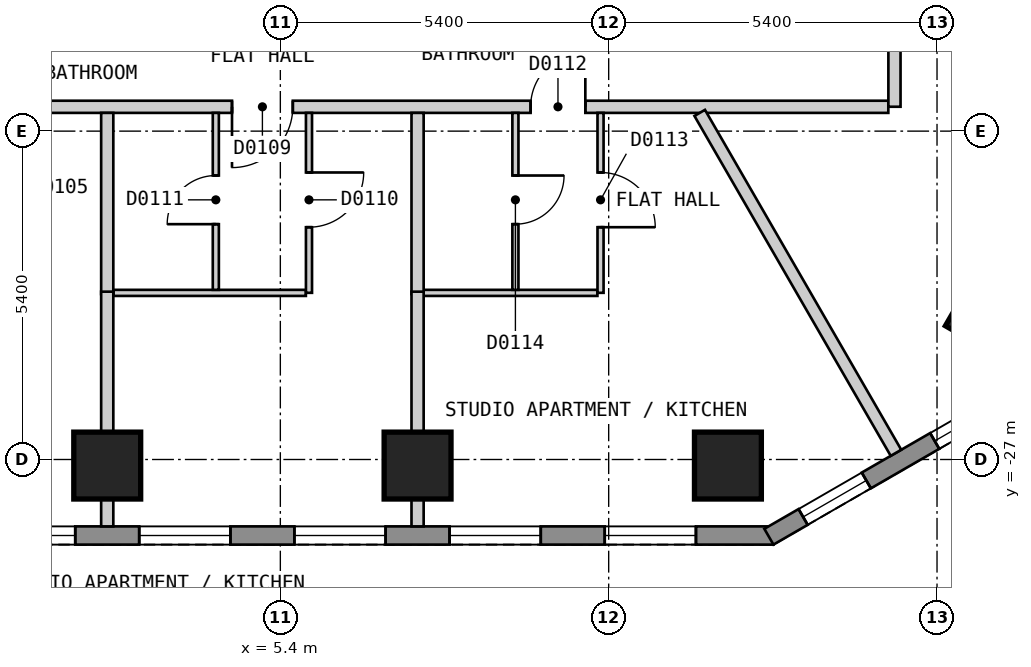
"""IFC4 building model, lengths in metres.
Left out: names, types, materials, properties, quantities, classifications, styles, units other than length and angle.
Written with IfcOpenShell. Run it as: python <this file> out.ifc"""

import sys

from ifc_helpers import new_model, si_unit, direction, frame, frame_2d, origin, origin_2d, place, context, subcontext, project, spatial, polyline, rectangle, outline, extrude, element, fill, save


model = new_model("IFC4")
c1 = context("Model", 3, precision=1e-05, world=origin(), true_north=direction((0.0, 1.0)))
c2 = subcontext(c1, "Body", "Model", "MODEL_VIEW")
j1 = project(units=[si_unit("LENGTHUNIT", "METRE"), si_unit("PLANEANGLEUNIT", "RADIAN")], contexts=[c1])
p1 = place(None, origin())
s1 = spatial("IfcSite", under=j1, at=p1, CompositionType="ELEMENT")
p2 = place(p1, origin())
s2 = spatial("IfcBuilding", under=s1, at=p2, CompositionType="ELEMENT")
p3 = place(p2, frame((0.0, 0.0, 23.4)))
s3 = spatial("IfcBuildingStorey", under=s2, at=p3, CompositionType="ELEMENT", Elevation=23.4)
for number, where, z_axis, x_axis in (
    (1, (2.553, -27.1, 0.0), (0.0, 0.0, 1.0), (1.0, 0.0, 0.0)),
    (2, (7.657, -27.1, 0.0), (0.0, 0.0, 1.0), (1.0, 0.0, 0.0)),
    (3, (12.761, -27.1, 0.0), (0.0, 0.0, 1.0), (1.0, 0.0, 0.0)),
    (4, (17.09, -24.6, 0.0), (0.0, 0.0, 1.0), (0.5, 0.866, 0.0)),
):
    element("IfcColumn", number, at=place(p3, frame(where, z_axis=z_axis, x_axis=x_axis)), inside=s3, PredefinedType="COLUMN", context=c2, shape_type="SweptSolid", body=[
        extrude(rectangle(XDim=1.1, YDim=1.1, at=origin_2d()), origin(), (0.0, 0.0, 1.0), 3.0),
    ])
p4 = place(p3, frame((-13.51, -28.25, 0.0), z_axis=(0.0, 0.0, 1.0), x_axis=(1.0, 0.0, 0.0)))
e5 = element("IfcWall", 5, at=p4, inside=s3, PredefinedType="SOLIDWALL", context=c2, shape_type="SweptSolid", body=[
    extrude(outline(polyline([(0.0, -0.15), (27.02, -0.15), (26.94, 0.15), (0.08, 0.15), (0.0, -0.15)])), origin(), (0.0, 0.0, 1.0), 2.7),
])
p5 = place(p4, frame((1.277, 0.0, 0.15)))
e6 = element("IfcOpeningElement", 6, at=p5, cuts=e5, PredefinedType="OPENING", context=c2, shape_type="SweptSolid", body=[
    extrude(rectangle(XDim=1.5, YDim=2.1, at=frame_2d((0.75, 1.05))), frame((0.0, 0.16, 0.0), z_axis=(0.0, -1.0, 0.0), x_axis=(1.0, 0.0, 0.0)), (0.0, 0.0, 1.0), 0.32),
])
p6 = place(p4, frame((3.829, 0.0, 0.15)))
e7 = element("IfcOpeningElement", 7, at=p6, cuts=e5, PredefinedType="OPENING", context=c2, shape_type="SweptSolid", body=[
    extrude(rectangle(XDim=1.5, YDim=2.1, at=frame_2d((0.75, 1.05))), frame((0.0, 0.16, 0.0), z_axis=(0.0, -1.0, 0.0), x_axis=(1.0, 0.0, 0.0)), (0.0, 0.0, 1.0), 0.32),
])
p7 = place(p4, frame((6.381, 0.0, 0.15)))
e8 = element("IfcOpeningElement", 8, at=p7, cuts=e5, PredefinedType="OPENING", context=c2, shape_type="SweptSolid", body=[
    extrude(rectangle(XDim=1.5, YDim=2.1, at=frame_2d((0.75, 1.05))), frame((0.0, 0.16, 0.0), z_axis=(0.0, -1.0, 0.0), x_axis=(1.0, 0.0, 0.0)), (0.0, 0.0, 1.0), 0.32),
])
p8 = place(p4, frame((8.933, 0.0, 0.15)))
e9 = element("IfcOpeningElement", 9, at=p8, cuts=e5, PredefinedType="OPENING", context=c2, shape_type="SweptSolid", body=[
    extrude(rectangle(XDim=1.5, YDim=2.1, at=frame_2d((0.75, 1.05))), frame((0.0, 0.16, 0.0), z_axis=(0.0, -1.0, 0.0), x_axis=(1.0, 0.0, 0.0)), (0.0, 0.0, 1.0), 0.32),
])
p9 = place(p4, frame((11.485, 0.0, 0.15)))
e10 = element("IfcOpeningElement", 10, at=p9, cuts=e5, PredefinedType="OPENING", context=c2, shape_type="SweptSolid", body=[
    extrude(rectangle(XDim=1.5, YDim=2.1, at=frame_2d((0.75, 1.05))), frame((0.0, 0.16, 0.0), z_axis=(0.0, -1.0, 0.0), x_axis=(1.0, 0.0, 0.0)), (0.0, 0.0, 1.0), 0.32),
])
p10 = place(p4, frame((14.037, 0.0, 0.15)))
e11 = element("IfcOpeningElement", 11, at=p10, cuts=e5, PredefinedType="OPENING", context=c2, shape_type="SweptSolid", body=[
    extrude(rectangle(XDim=1.5, YDim=2.1, at=frame_2d((0.75, 1.05))), frame((0.0, 0.16, 0.0), z_axis=(0.0, -1.0, 0.0), x_axis=(1.0, 0.0, 0.0)), (0.0, 0.0, 1.0), 0.32),
])
p11 = place(p4, frame((16.589, 0.0, 0.15)))
e12 = element("IfcOpeningElement", 12, at=p11, cuts=e5, PredefinedType="OPENING", context=c2, shape_type="SweptSolid", body=[
    extrude(rectangle(XDim=1.5, YDim=2.1, at=frame_2d((0.75, 1.05))), frame((0.0, 0.16, 0.0), z_axis=(0.0, -1.0, 0.0), x_axis=(1.0, 0.0, 0.0)), (0.0, 0.0, 1.0), 0.32),
])
p12 = place(p4, frame((19.141, 0.0, 0.15)))
e13 = element("IfcOpeningElement", 13, at=p12, cuts=e5, PredefinedType="OPENING", context=c2, shape_type="SweptSolid", body=[
    extrude(rectangle(XDim=1.5, YDim=2.1, at=frame_2d((0.75, 1.05))), frame((0.0, 0.16, 0.0), z_axis=(0.0, -1.0, 0.0), x_axis=(1.0, 0.0, 0.0)), (0.0, 0.0, 1.0), 0.32),
])
p13 = place(p4, frame((21.693, 0.0, 0.15)))
e14 = element("IfcOpeningElement", 14, at=p13, cuts=e5, PredefinedType="OPENING", context=c2, shape_type="SweptSolid", body=[
    extrude(rectangle(XDim=1.5, YDim=2.1, at=frame_2d((0.75, 1.05))), frame((0.0, 0.16, 0.0), z_axis=(0.0, -1.0, 0.0), x_axis=(1.0, 0.0, 0.0)), (0.0, 0.0, 1.0), 0.32),
])
p14 = place(p4, frame((24.245, 0.0, 0.15)))
e15 = element("IfcOpeningElement", 15, at=p14, cuts=e5, PredefinedType="OPENING", context=c2, shape_type="SweptSolid", body=[
    extrude(rectangle(XDim=1.5, YDim=2.1, at=frame_2d((0.75, 1.05))), frame((0.0, 0.16, 0.0), z_axis=(0.0, -1.0, 0.0), x_axis=(1.0, 0.0, 0.0)), (0.0, 0.0, 1.0), 0.32),
])
p15 = place(p3, frame((13.435, -28.27, 0.0), z_axis=(0.0, 0.0, 1.0), x_axis=(0.866010750942, 0.50002537861, 0.0)))
e16 = element("IfcWall", 16, at=p15, inside=s3, PredefinedType="SOLIDWALL", context=c2, shape_type="SweptSolid", body=[
    extrude(outline(polyline([(0.0, -0.15), (5.0, -0.15), (4.919, 0.15), (0.08, 0.15), (0.0, -0.15)])), origin(), (0.0, 0.0, 1.0), 2.7),
])
p16 = place(p15, frame((0.65, 0.0, 0.15)))
e17 = element("IfcOpeningElement", 17, at=p16, cuts=e16, PredefinedType="OPENING", context=c2, shape_type="SweptSolid", body=[
    extrude(rectangle(XDim=1.2, YDim=2.1, at=frame_2d((0.6, 1.05))), frame((0.0, 0.16, 0.0), z_axis=(0.0, -1.0, 0.0), x_axis=(1.0, 0.0, 0.0)), (0.0, 0.0, 1.0), 0.32),
])
p17 = place(p15, frame((3.149, 0.0, 0.15)))
e18 = element("IfcOpeningElement", 18, at=p17, cuts=e16, PredefinedType="OPENING", context=c2, shape_type="SweptSolid", body=[
    extrude(rectangle(XDim=1.2, YDim=2.1, at=frame_2d((0.6, 1.05))), frame((0.0, 0.16, 0.0), z_axis=(0.0, -1.0, 0.0), x_axis=(1.0, 0.0, 0.0)), (0.0, 0.0, 1.0), 0.32),
])
p18 = place(p3, frame((-15.4, -21.2, 0.0), z_axis=(0.0, 0.0, 1.0), x_axis=(1.0, 0.0, 0.0)))
e19 = element("IfcWall", 19, at=p18, inside=s3, PredefinedType="PARTITIONING", context=c2, shape_type="SweptSolid", body=[
    extrude(rectangle(XDim=30.799, YDim=0.2, at=frame_2d((15.399, 0.0))), origin(), (0.0, 0.0, 1.0), 2.7),
])
p19 = place(p18, frame((4.985, 0.0, 0.0)))
e20 = element("IfcOpeningElement", 20, at=p19, cuts=e19, PredefinedType="OPENING", context=c2, shape_type="SweptSolid", body=[
    extrude(rectangle(XDim=0.9, YDim=2.1, at=frame_2d((0.45, 1.05))), frame((0.0, 0.11, 0.0), z_axis=(0.0, -1.0, 0.0), x_axis=(1.0, 0.0, 0.0)), (0.0, 0.0, 1.0), 0.22),
])
p20 = place(p18, frame((14.901, 0.0, 0.0)))
e21 = element("IfcOpeningElement", 21, at=p20, cuts=e19, PredefinedType="OPENING", context=c2, shape_type="SweptSolid", body=[
    extrude(rectangle(XDim=1.0, YDim=2.1, at=frame_2d((0.5, 1.05))), frame((0.0, 0.11, 0.0), z_axis=(0.0, -1.0, 0.0), x_axis=(1.0, 0.0, 0.0)), (0.0, 0.0, 1.0), 0.22),
])
p21 = place(p18, frame((20.005, 0.0, 0.0)))
e22 = element("IfcOpeningElement", 22, at=p21, cuts=e19, PredefinedType="OPENING", context=c2, shape_type="SweptSolid", body=[
    extrude(rectangle(XDim=1.0, YDim=2.1, at=frame_2d((0.5, 1.05))), frame((0.0, 0.11, 0.0), z_axis=(0.0, -1.0, 0.0), x_axis=(1.0, 0.0, 0.0)), (0.0, 0.0, 1.0), 0.22),
])
p22 = place(p18, frame((24.916, 0.0, 0.0)))
e23 = element("IfcOpeningElement", 23, at=p22, cuts=e19, PredefinedType="OPENING", context=c2, shape_type="SweptSolid", body=[
    extrude(rectangle(XDim=0.9, YDim=2.1, at=frame_2d((0.45, 1.05))), frame((0.0, 0.11, 0.0), z_axis=(0.0, -1.0, 0.0), x_axis=(1.0, 0.0, 0.0)), (0.0, 0.0, 1.0), 0.22),
])
p23 = place(p3, frame((15.5, -21.199, 0.0), z_axis=(0.0, 0.0, 1.0), x_axis=(0.0, 1.0, 0.0)))
e24 = element("IfcWall", 24, at=p23, inside=s3, PredefinedType="PARTITIONING", context=c2, shape_type="SweptSolid", body=[
    extrude(rectangle(XDim=7.575, YDim=0.2, at=frame_2d((3.788, 0.0))), origin(), (0.0, 0.0, 1.0), 2.7),
])
p24 = place(p23, frame((1.288, 0.0, 0.0)))
e25 = element("IfcOpeningElement", 25, at=p24, cuts=e24, PredefinedType="OPENING", context=c2, shape_type="SweptSolid", body=[
    extrude(rectangle(XDim=0.8, YDim=2.1, at=frame_2d((0.4, 1.05))), frame((0.0, 0.11, 0.0), z_axis=(0.0, -1.0, 0.0), x_axis=(1.0, 0.0, 0.0)), (0.0, 0.0, 1.0), 0.22),
])
p25 = place(p3, frame((2.653, -24.26, 0.0), z_axis=(0.0, 0.0, 1.0), x_axis=(1.0, 0.0, 0.0)))
e26 = element("IfcWall", 26, at=p25, inside=s3, PredefinedType="PARTITIONING", context=c2, shape_type="SweptSolid", body=[
    extrude(rectangle(XDim=3.167, YDim=0.1, at=frame_2d((1.583, 0.0))), origin(), (0.0, 0.0, 1.0), 2.7),
])
p26 = place(p3, frame((7.757, -24.26, 0.0), z_axis=(0.0, 0.0, 1.0), x_axis=(1.0, 0.0, 0.0)))
e27 = element("IfcWall", 27, at=p26, inside=s3, PredefinedType="PARTITIONING", context=c2, shape_type="SweptSolid", body=[
    extrude(rectangle(XDim=2.858, YDim=0.1, at=frame_2d((1.429, 0.0))), origin(), (0.0, 0.0, 1.0), 2.7),
])
p27 = place(p3, frame((4.339, -24.21, 0.0), z_axis=(0.0, 0.0, 1.0), x_axis=(0.0, 1.0, 0.0)))
e28 = element("IfcWall", 28, at=p27, inside=s3, PredefinedType="PARTITIONING", context=c2, shape_type="SweptSolid", body=[
    extrude(rectangle(XDim=2.91, YDim=0.1, at=frame_2d((1.455, 0.0))), origin(), (0.0, 0.0, 1.0), 2.7),
])
p28 = place(p27, frame((1.08, 0.0, 0.0)))
e29 = element("IfcOpeningElement", 29, at=p28, cuts=e28, PredefinedType="OPENING", context=c2, shape_type="SweptSolid", body=[
    extrude(rectangle(XDim=0.8, YDim=2.1, at=frame_2d((0.4, 1.05))), frame((0.0, 0.06, 0.0), z_axis=(0.0, -1.0, 0.0), x_axis=(1.0, 0.0, 0.0)), (0.0, 0.0, 1.0), 0.12),
])
p29 = place(p3, frame((5.871, -24.259, 0.0), z_axis=(0.0, 0.0, 1.0), x_axis=(0.0, 1.0, 0.0)))
e30 = element("IfcWall", 30, at=p29, inside=s3, PredefinedType="PARTITIONING", context=c2, shape_type="SweptSolid", body=[
    extrude(rectangle(XDim=2.959, YDim=0.1, at=frame_2d((1.479, 0.0))), origin(), (0.0, 0.0, 1.0), 2.7),
])
p30 = place(p29, frame((1.079, 0.0, 0.0)))
e31 = element("IfcOpeningElement", 31, at=p30, cuts=e30, PredefinedType="OPENING", context=c2, shape_type="SweptSolid", body=[
    extrude(rectangle(XDim=0.9, YDim=2.1, at=frame_2d((0.45, 1.05))), frame((0.0, 0.06, 0.0), z_axis=(0.0, -1.0, 0.0), x_axis=(1.0, 0.0, 0.0)), (0.0, 0.0, 1.0), 0.12),
])
p31 = place(p3, frame((9.266, -24.21, 0.0), z_axis=(0.0, 0.0, 1.0), x_axis=(0.0, 1.0, 0.0)))
e32 = element("IfcWall", 32, at=p31, inside=s3, PredefinedType="PARTITIONING", context=c2, shape_type="SweptSolid", body=[
    extrude(rectangle(XDim=2.91, YDim=0.1, at=frame_2d((1.455, 0.0))), origin(), (0.0, 0.0, 1.0), 2.7),
])
p32 = place(p31, frame((1.08, 0.0, 0.0)))
e33 = element("IfcOpeningElement", 33, at=p32, cuts=e32, PredefinedType="OPENING", context=c2, shape_type="SweptSolid", body=[
    extrude(rectangle(XDim=0.8, YDim=2.1, at=frame_2d((0.4, 1.05))), frame((0.0, 0.06, 0.0), z_axis=(0.0, -1.0, 0.0), x_axis=(1.0, 0.0, 0.0)), (0.0, 0.0, 1.0), 0.12),
])
p33 = place(p3, frame((10.666, -24.259, 0.0), z_axis=(0.0, 0.0, 1.0), x_axis=(0.0, 1.0, 0.0)))
e34 = element("IfcWall", 34, at=p33, inside=s3, PredefinedType="PARTITIONING", context=c2, shape_type="SweptSolid", body=[
    extrude(rectangle(XDim=2.959, YDim=0.1, at=frame_2d((1.479, 0.0))), origin(), (0.0, 0.0, 1.0), 2.7),
])
p34 = place(p33, frame((1.079, 0.0, 0.0)))
e35 = element("IfcOpeningElement", 35, at=p34, cuts=e34, PredefinedType="OPENING", context=c2, shape_type="SweptSolid", body=[
    extrude(rectangle(XDim=0.9, YDim=2.1, at=frame_2d((0.45, 1.05))), frame((0.0, 0.06, 0.0), z_axis=(0.0, -1.0, 0.0), x_axis=(1.0, 0.0, 0.0)), (0.0, 0.0, 1.0), 0.12),
])
p35 = place(p3, frame((12.297, -21.3, 0.0), z_axis=(0.0, 0.0, 1.0), x_axis=(0.500056399578, -0.865992839024, 0.0)))
e36 = element("IfcWall", 36, at=p35, inside=s3, PredefinedType="PARTITIONING", context=c2, shape_type="SweptSolid", body=[
    extrude(rectangle(XDim=6.455, YDim=0.2, at=frame_2d((3.228, 0.0))), origin(), (0.0, 0.0, 1.0), 2.7),
])
for number, where, z_axis, x_axis in (
    (37, (7.657, -21.3, 0.0), (0.0, 0.0, 1.0), (0.0, -1.0, 0.0)),
    (38, (2.553, -21.3, 0.0), (0.0, 0.0, 1.0), (0.0, -1.0, 0.0)),
):
    element("IfcWall", number, at=place(p3, frame(where, z_axis=z_axis, x_axis=x_axis)), inside=s3, PredefinedType="PARTITIONING", context=c2, shape_type="SweptSolid", body=[
        extrude(rectangle(XDim=2.98, YDim=0.2, at=frame_2d((1.49, 0.0))), origin(), (0.0, 0.0, 1.0), 2.7),
    ])
p36 = place(p3, frame((15.6, -17.846, 0.0), z_axis=(0.0, 0.0, 1.0), x_axis=(0.866071523686, -0.499920109479, 0.0)))
e39 = element("IfcWall", 39, at=p36, inside=s3, PredefinedType="PARTITIONING", context=c2, shape_type="SweptSolid", body=[
    extrude(rectangle(XDim=5.667, YDim=0.2, at=frame_2d((2.833, 0.0))), origin(), (0.0, 0.0, 1.0), 2.7),
])
for number, where, z_axis, x_axis in (
    (40, (7.657, -28.1, 0.0), (0.0, 0.0, 1.0), (0.0, 1.0, 0.0)),
    (41, (2.553, -28.1, 0.0), (0.0, 0.0, 1.0), (0.0, 1.0, 0.0)),
):
    element("IfcWall", number, at=place(p3, frame(where, z_axis=z_axis, x_axis=x_axis)), inside=s3, PredefinedType="PARTITIONING", context=c2, shape_type="SweptSolid", body=[
        extrude(rectangle(XDim=3.86, YDim=0.2, at=frame_2d((1.93, 0.0))), origin(), (0.0, 0.0, 1.0), 2.7),
    ])
p37 = place(p10, origin())
e42 = element("IfcWindow", 42, at=p37, inside=s3, PartitioningType="SINGLE_PANEL", PredefinedType="WINDOW", context=c2, shape_type="SweptSolid", body=[
    extrude(rectangle(XDim=1.5, YDim=2.1, at=frame_2d((0.75, 1.05))), frame((0.0, 0.03, 0.0), z_axis=(0.0, -1.0, 0.0), x_axis=(1.0, 0.0, 0.0)), (0.0, 0.0, 1.0), 0.06),
])
fill(e11, e42)
p38 = place(p11, origin())
e43 = element("IfcWindow", 43, at=p38, inside=s3, PartitioningType="SINGLE_PANEL", PredefinedType="WINDOW", context=c2, shape_type="SweptSolid", body=[
    extrude(rectangle(XDim=1.5, YDim=2.1, at=frame_2d((0.75, 1.05))), frame((0.0, 0.03, 0.0), z_axis=(0.0, -1.0, 0.0), x_axis=(1.0, 0.0, 0.0)), (0.0, 0.0, 1.0), 0.06),
])
fill(e12, e43)
p39 = place(p12, origin())
e44 = element("IfcWindow", 44, at=p39, inside=s3, PartitioningType="SINGLE_PANEL", PredefinedType="WINDOW", context=c2, shape_type="SweptSolid", body=[
    extrude(rectangle(XDim=1.5, YDim=2.1, at=frame_2d((0.75, 1.05))), frame((0.0, 0.03, 0.0), z_axis=(0.0, -1.0, 0.0), x_axis=(1.0, 0.0, 0.0)), (0.0, 0.0, 1.0), 0.06),
])
fill(e13, e44)
p40 = place(p13, origin())
e45 = element("IfcWindow", 45, at=p40, inside=s3, PartitioningType="SINGLE_PANEL", PredefinedType="WINDOW", context=c2, shape_type="SweptSolid", body=[
    extrude(rectangle(XDim=1.5, YDim=2.1, at=frame_2d((0.75, 1.05))), frame((0.0, 0.03, 0.0), z_axis=(0.0, -1.0, 0.0), x_axis=(1.0, 0.0, 0.0)), (0.0, 0.0, 1.0), 0.06),
])
fill(e14, e45)
p41 = place(p14, origin())
e46 = element("IfcWindow", 46, at=p41, inside=s3, PartitioningType="SINGLE_PANEL", PredefinedType="WINDOW", context=c2, shape_type="SweptSolid", body=[
    extrude(rectangle(XDim=1.5, YDim=2.1, at=frame_2d((0.75, 1.05))), frame((0.0, 0.03, 0.0), z_axis=(0.0, -1.0, 0.0), x_axis=(1.0, 0.0, 0.0)), (0.0, 0.0, 1.0), 0.06),
])
fill(e15, e46)
p42 = place(p16, origin())
e47 = element("IfcWindow", 47, at=p42, inside=s3, PartitioningType="SINGLE_PANEL", PredefinedType="WINDOW", context=c2, shape_type="SweptSolid", body=[
    extrude(rectangle(XDim=1.2, YDim=2.1, at=frame_2d((0.6, 1.05))), frame((0.0, 0.03, 0.0), z_axis=(0.0, -1.0, 0.0), x_axis=(1.0, 0.0, 0.0)), (0.0, 0.0, 1.0), 0.06),
])
fill(e17, e47)
p43 = place(p17, origin())
e48 = element("IfcWindow", 48, at=p43, inside=s3, PartitioningType="SINGLE_PANEL", PredefinedType="WINDOW", context=c2, shape_type="SweptSolid", body=[
    extrude(rectangle(XDim=1.2, YDim=2.1, at=frame_2d((0.6, 1.05))), frame((0.0, 0.03, 0.0), z_axis=(0.0, -1.0, 0.0), x_axis=(1.0, 0.0, 0.0)), (0.0, 0.0, 1.0), 0.06),
])
fill(e18, e48)
p44 = place(p21, origin())
e49 = element("IfcDoor", 49, at=p44, inside=s3, OperationType="SINGLE_SWING_LEFT", PredefinedType="DOOR", context=c2, shape_type="SweptSolid", body=[
    extrude(rectangle(XDim=1.0, YDim=2.1, at=frame_2d((0.5, 1.05))), frame((0.0, 0.025, 0.0), z_axis=(0.0, -1.0, 0.0), x_axis=(1.0, 0.0, 0.0)), (0.0, 0.0, 1.0), 0.05),
])
fill(e22, e49)
p45 = place(p30, origin())
e50 = element("IfcDoor", 50, at=p45, inside=s3, OperationType="SINGLE_SWING_RIGHT", PredefinedType="DOOR", context=c2, shape_type="SweptSolid", body=[
    extrude(rectangle(XDim=0.9, YDim=2.1, at=frame_2d((0.45, 1.05))), frame((0.0, 0.025, 0.0), z_axis=(0.0, -1.0, 0.0), x_axis=(1.0, 0.0, 0.0)), (0.0, 0.0, 1.0), 0.05),
])
fill(e31, e50)
p46 = place(p28, origin())
e51 = element("IfcDoor", 51, at=p46, inside=s3, OperationType="SINGLE_SWING_LEFT", PredefinedType="DOOR", context=c2, shape_type="SweptSolid", body=[
    extrude(rectangle(XDim=0.8, YDim=2.1, at=frame_2d((0.4, 1.05))), frame((0.0, 0.025, 0.0), z_axis=(0.0, -1.0, 0.0), x_axis=(1.0, 0.0, 0.0)), (0.0, 0.0, 1.0), 0.05),
])
fill(e29, e51)
p47 = place(p22, origin())
e52 = element("IfcDoor", 52, at=p47, inside=s3, OperationType="SINGLE_SWING_RIGHT", PredefinedType="DOOR", context=c2, shape_type="SweptSolid", body=[
    extrude(rectangle(XDim=0.9, YDim=2.1, at=frame_2d((0.45, 1.05))), frame((0.0, 0.025, 0.0), z_axis=(0.0, -1.0, 0.0), x_axis=(1.0, 0.0, 0.0)), (0.0, 0.0, 1.0), 0.05),
])
fill(e23, e52)
p48 = place(p34, origin())
e53 = element("IfcDoor", 53, at=p48, inside=s3, OperationType="SINGLE_SWING_LEFT", PredefinedType="DOOR", context=c2, shape_type="SweptSolid", body=[
    extrude(rectangle(XDim=0.9, YDim=2.1, at=frame_2d((0.45, 1.05))), frame((0.0, 0.025, 0.0), z_axis=(0.0, -1.0, 0.0), x_axis=(1.0, 0.0, 0.0)), (0.0, 0.0, 1.0), 0.05),
])
fill(e35, e53)
p49 = place(p32, origin())
e54 = element("IfcDoor", 54, at=p49, inside=s3, OperationType="SINGLE_SWING_RIGHT", PredefinedType="DOOR", context=c2, shape_type="SweptSolid", body=[
    extrude(rectangle(XDim=0.8, YDim=2.1, at=frame_2d((0.4, 1.05))), frame((0.0, 0.025, 0.0), z_axis=(0.0, -1.0, 0.0), x_axis=(1.0, 0.0, 0.0)), (0.0, 0.0, 1.0), 0.05),
])
fill(e33, e54)
save(model, sys.argv[1])
